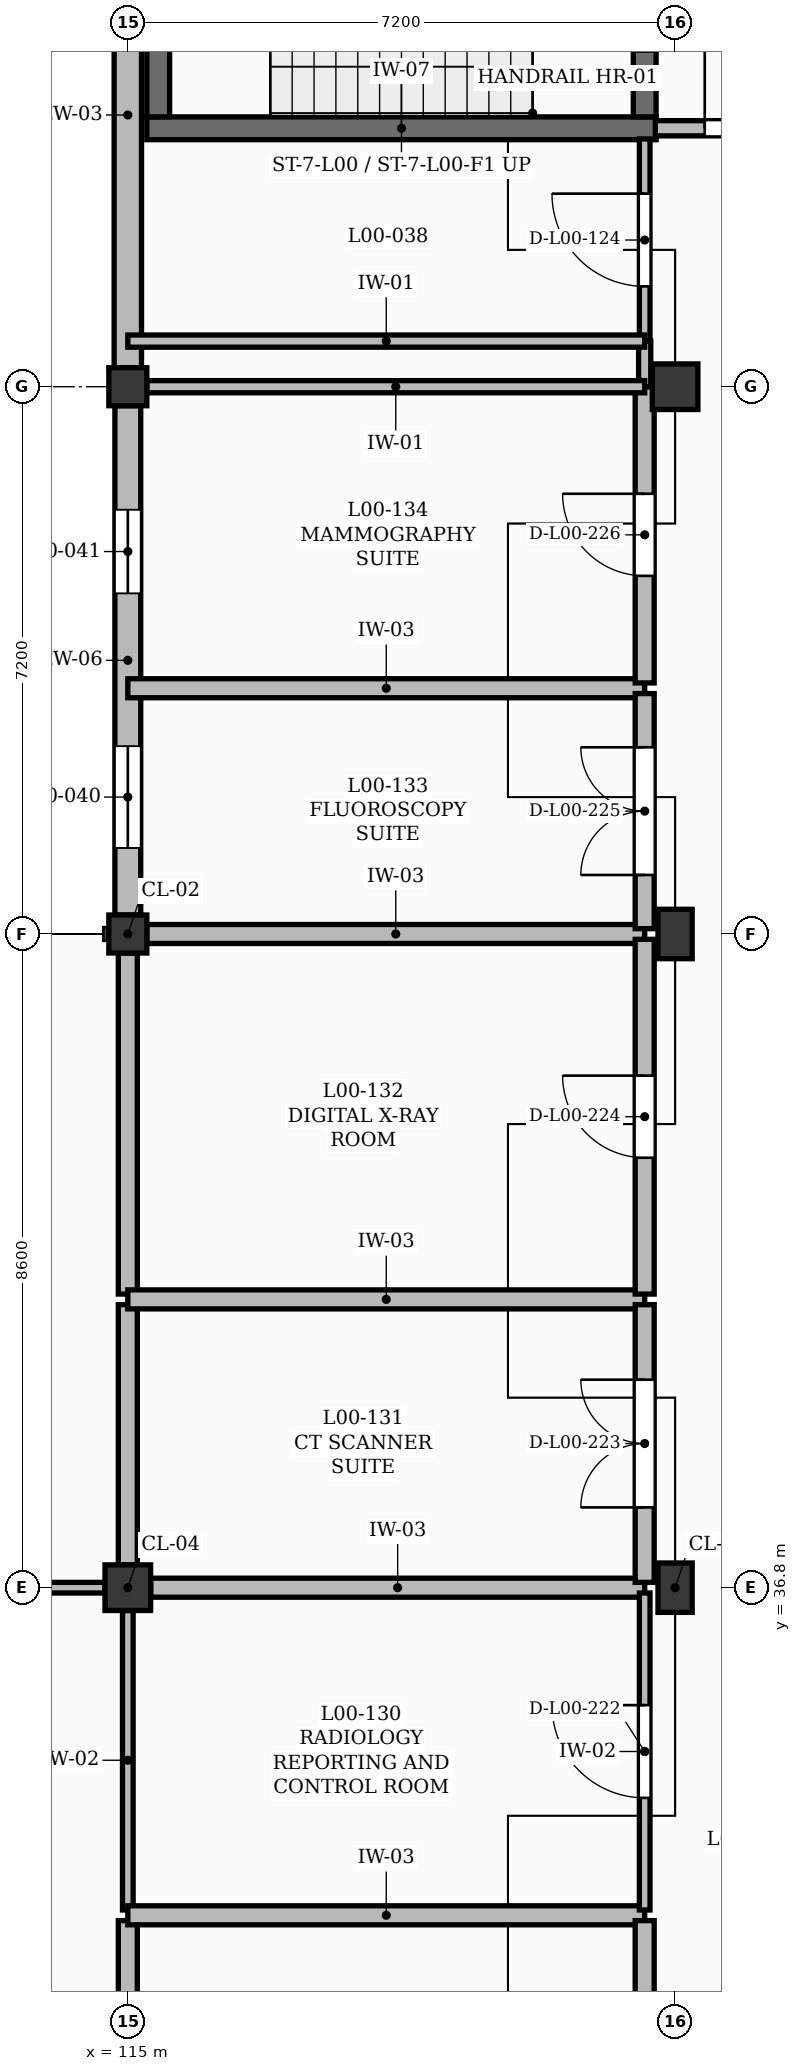
"""IFC4 building model, lengths in metres.
Left out: names, types, materials, properties, quantities, classifications, styles, units other than length and angle.
Written with IfcOpenShell. Run it as: python <this file> out.ifc"""

import sys

from ifc_helpers import new_model, si_unit, direction, frame, frame_2d, origin, origin_2d, place, context, subcontext, project, spatial, rectangle, extrude, element, fill, save


model = new_model("IFC4")
c1 = context("Model", 3, precision=1e-05, world=origin(), true_north=direction((0.0, 1.0)))
c2 = subcontext(c1, "Body", "Model", "MODEL_VIEW")
j1 = project(units=[si_unit("LENGTHUNIT", "METRE"), si_unit("PLANEANGLEUNIT", "RADIAN")], contexts=[c1])
p1 = place(None, origin())
s1 = spatial("IfcSite", under=j1, at=p1, CompositionType="ELEMENT")
p2 = place(p1, origin())
s2 = spatial("IfcBuilding", under=s1, at=p2, CompositionType="ELEMENT")
p3 = place(p2, origin())
s3 = spatial("IfcBuildingStorey", under=s2, at=p3, CompositionType="ELEMENT", Elevation=0.0)
p4 = place(p3, frame((115.0, 36.8, 0.0), z_axis=(0.0, 0.0, 1.0), x_axis=(1.0, 0.0, 0.0)))
e1 = element("IfcColumn", 1, at=p4, inside=s3, PredefinedType="COLUMN", context=c2, shape_type="SweptSolid", body=[
    extrude(rectangle(XDim=0.6, YDim=0.6, at=origin_2d()), origin(), (0.0, 0.0, 1.0), 4.2),
])
for number, where, z_axis, x_axis in (
    (2, (115.0, 45.4, 0.0), (0.0, 0.0, 1.0), (1.0, 0.0, 0.0)),
    (3, (115.0, 52.6, 0.0), (0.0, 0.0, 1.0), (1.0, 0.0, 0.0)),
):
    element("IfcColumn", number, at=place(p3, frame(where, z_axis=z_axis, x_axis=x_axis)), inside=s3, PredefinedType="COLUMN", context=c2, shape_type="SweptSolid", body=[
        extrude(rectangle(XDim=0.5, YDim=0.5, at=origin_2d()), origin(), (0.0, 0.0, 1.0), 4.2),
    ])
for number, where, z_axis, x_axis in (
    (4, (122.2, 36.8, 0.0), (0.0, 0.0, 1.0), (1.0, 0.0, 0.0)),
    (5, (122.2, 45.4, 0.0), (0.0, 0.0, 1.0), (1.0, 0.0, 0.0)),
):
    element("IfcColumn", number, at=place(p3, frame(where, z_axis=z_axis, x_axis=x_axis)), inside=s3, PredefinedType="COLUMN", context=c2, shape_type="SweptSolid", body=[
        extrude(rectangle(XDim=0.45, YDim=0.65, at=origin_2d()), origin(), (0.0, 0.0, 1.0), 4.2),
    ])
p5 = place(p3, frame((122.2, 52.6, 0.0), z_axis=(0.0, 0.0, 1.0), x_axis=(1.0, 0.0, 0.0)))
e6 = element("IfcColumn", 6, at=p5, inside=s3, PredefinedType="COLUMN", context=c2, shape_type="SweptSolid", body=[
    extrude(rectangle(XDim=0.6, YDim=0.6, at=origin_2d()), origin(), (0.0, 0.0, 1.0), 4.2),
])
p6 = place(p3, frame((115.0, 45.65, 0.0), z_axis=(0.0, 0.0, 1.0), x_axis=(0.0, 1.0, 0.0)))
e7 = element("IfcWall", 7, at=p6, inside=s3, PredefinedType="SOLIDWALL", context=c2, shape_type="SweptSolid", body=[
    extrude(rectangle(XDim=6.7, YDim=0.34, at=frame_2d((3.35, 0.0))), origin(), (0.0, 0.0, 1.0), 3.68),
])
p7 = place(p6, frame((0.881, 0.0, 1.0)))
e8 = element("IfcOpeningElement", 8, at=p7, cuts=e7, PredefinedType="OPENING", context=c2, shape_type="SweptSolid", body=[
    extrude(rectangle(XDim=1.34, YDim=1.95, at=frame_2d((0.67, 0.975))), frame((0.0, 0.18, 0.0), z_axis=(0.0, -1.0, 0.0), x_axis=(1.0, 0.0, 0.0)), (0.0, 0.0, 1.0), 0.36),
])
p8 = place(p6, frame((4.231, 0.0, 1.0)))
e9 = element("IfcOpeningElement", 9, at=p8, cuts=e7, PredefinedType="OPENING", context=c2, shape_type="SweptSolid", body=[
    extrude(rectangle(XDim=1.1, YDim=2.2, at=frame_2d((0.55, 1.1))), frame((0.0, 0.18, 0.0), z_axis=(0.0, -1.0, 0.0), x_axis=(1.0, 0.0, 0.0)), (0.0, 0.0, 1.0), 0.36),
])
p9 = place(p3, frame((115.0, 52.85, 0.0), z_axis=(0.0, 0.0, 1.0), x_axis=(0.0, 1.0, 0.0)))
e10 = element("IfcWall", 10, at=p9, inside=s3, PredefinedType="SOLIDWALL", context=c2, shape_type="SweptSolid", body=[
    extrude(rectangle(XDim=6.65, YDim=0.36, at=frame_2d((3.325, 0.0))), origin(), (0.0, 0.0, 1.0), 3.68),
])
p10 = place(p3, frame((115.25, 56.0, 0.0), z_axis=(0.0, 0.0, 1.0), x_axis=(1.0, 0.0, 0.0)))
e11 = element("IfcWall", 11, at=p10, inside=s3, PredefinedType="SHEAR", context=c2, shape_type="SweptSolid", body=[
    extrude(rectangle(XDim=6.7, YDim=0.3, at=frame_2d((3.35, 0.0))), origin(), (0.0, 0.0, 1.0), 4.25),
])
p11 = place(p3, frame((115.4, 56.15, 0.0), z_axis=(0.0, 0.0, 1.0), x_axis=(0.0, 1.0, 0.0)))
e12 = element("IfcWall", 12, at=p11, inside=s3, PredefinedType="SHEAR", context=c2, shape_type="SweptSolid", body=[
    extrude(rectangle(XDim=2.9, YDim=0.3, at=frame_2d((1.45, 0.0))), origin(), (0.0, 0.0, 1.0), 4.25),
])
p12 = place(p3, frame((121.8, 56.15, 0.0), z_axis=(0.0, 0.0, 1.0), x_axis=(0.0, 1.0, 0.0)))
e13 = element("IfcWall", 13, at=p12, inside=s3, PredefinedType="SHEAR", context=c2, shape_type="SweptSolid", body=[
    extrude(rectangle(XDim=2.9, YDim=0.3, at=frame_2d((1.45, 0.0))), origin(), (0.0, 0.0, 1.0), 4.25),
])
p13 = place(p12, frame((0.86, 0.0, 0.0)))
e14 = element("IfcOpeningElement", 14, at=p13, cuts=e13, PredefinedType="OPENING", context=c2, shape_type="SweptSolid", body=[
    extrude(rectangle(XDim=1.18, YDim=2.15, at=frame_2d((0.59, 1.075))), frame((0.0, 0.16, 0.0), z_axis=(0.0, -1.0, 0.0), x_axis=(1.0, 0.0, 0.0)), (0.0, 0.0, 1.0), 0.32),
])
p14 = place(p3, frame((110.6, 36.8, 0.0), z_axis=(0.0, 0.0, 1.0), x_axis=(1.0, 0.0, 0.0)))
e15 = element("IfcWall", 15, at=p14, inside=s3, PredefinedType="PARTITIONING", context=c2, shape_type="SweptSolid", body=[
    extrude(rectangle(XDim=4.1, YDim=0.14, at=frame_2d((2.05, 0.0))), origin(), (0.0, 0.0, 1.0), 3.5),
])
p15 = place(p3, frame((115.0, 27.45, 0.0), z_axis=(0.0, 0.0, 1.0), x_axis=(0.0, 1.0, 0.0)))
e16 = element("IfcWall", 16, at=p15, inside=s3, PredefinedType="SOLIDWALL", context=c2, shape_type="SweptSolid", body=[
    extrude(rectangle(XDim=4.97, YDim=0.25, at=frame_2d((2.485, 0.0))), origin(), (0.0, 0.0, 1.0), 3.4),
])
p16 = place(p3, frame((115.0, 32.56, 0.0), z_axis=(0.0, 0.0, 1.0), x_axis=(0.0, 1.0, 0.0)))
e17 = element("IfcWall", 17, at=p16, inside=s3, PredefinedType="PARTITIONING", context=c2, shape_type="SweptSolid", body=[
    extrude(rectangle(XDim=3.94, YDim=0.14, at=frame_2d((1.97, 0.0))), origin(), (0.0, 0.0, 1.0), 3.4),
])
p17 = place(p3, frame((115.0, 32.49, 0.0), z_axis=(0.0, 0.0, 1.0), x_axis=(1.0, 0.0, 0.0)))
e18 = element("IfcWall", 18, at=p17, inside=s3, PredefinedType="SOLIDWALL", context=c2, shape_type="SweptSolid", body=[
    extrude(rectangle(XDim=6.8, YDim=0.25, at=frame_2d((3.4, 0.0))), origin(), (0.0, 0.0, 1.0), 4.18),
])
p18 = place(p3, frame((115.0, 37.1, 0.0), z_axis=(0.0, 0.0, 1.0), x_axis=(0.0, 1.0, 0.0)))
e19 = element("IfcWall", 19, at=p18, inside=s3, PredefinedType="SOLIDWALL", context=c2, shape_type="SweptSolid", body=[
    extrude(rectangle(XDim=3.423, YDim=0.25, at=frame_2d((1.711, 0.0))), origin(), (0.0, 0.0, 1.0), 3.4),
])
p19 = place(p3, frame((115.3, 36.8, 0.0), z_axis=(0.0, 0.0, 1.0), x_axis=(1.0, 0.0, 0.0)))
e20 = element("IfcWall", 20, at=p19, inside=s3, PredefinedType="SOLIDWALL", context=c2, shape_type="SweptSolid", body=[
    extrude(rectangle(XDim=6.5, YDim=0.25, at=frame_2d((3.25, 0.0))), origin(), (0.0, 0.0, 1.0), 3.5),
])
p20 = place(p3, frame((115.0, 40.663, 0.0), z_axis=(0.0, 0.0, 1.0), x_axis=(0.0, 1.0, 0.0)))
e21 = element("IfcWall", 21, at=p20, inside=s3, PredefinedType="SOLIDWALL", context=c2, shape_type="SweptSolid", body=[
    extrude(rectangle(XDim=4.487, YDim=0.25, at=frame_2d((2.243, 0.0))), origin(), (0.0, 0.0, 1.0), 3.4),
])
p21 = place(p3, frame((115.0, 40.593, 0.0), z_axis=(0.0, 0.0, 1.0), x_axis=(1.0, 0.0, 0.0)))
e22 = element("IfcWall", 22, at=p21, inside=s3, PredefinedType="SOLIDWALL", context=c2, shape_type="SweptSolid", body=[
    extrude(rectangle(XDim=6.8, YDim=0.25, at=frame_2d((3.4, 0.0))), origin(), (0.0, 0.0, 1.0), 4.18),
])
p22 = place(p3, frame((115.25, 45.4, 0.0), z_axis=(0.0, 0.0, 1.0), x_axis=(1.0, 0.0, 0.0)))
e23 = element("IfcWall", 23, at=p22, inside=s3, PredefinedType="SOLIDWALL", context=c2, shape_type="SweptSolid", body=[
    extrude(rectangle(XDim=6.55, YDim=0.25, at=frame_2d((3.275, 0.0))), origin(), (0.0, 0.0, 1.0), 3.25),
])
p23 = place(p3, frame((115.0, 48.633, 0.0), z_axis=(0.0, 0.0, 1.0), x_axis=(1.0, 0.0, 0.0)))
e24 = element("IfcWall", 24, at=p23, inside=s3, PredefinedType="SOLIDWALL", context=c2, shape_type="SweptSolid", body=[
    extrude(rectangle(XDim=6.8, YDim=0.25, at=frame_2d((3.4, 0.0))), origin(), (0.0, 0.0, 1.0), 4.18),
])
p24 = place(p3, frame((121.8, 27.27, 0.0), z_axis=(0.0, 0.0, 1.0), x_axis=(0.0, 1.0, 0.0)))
e25 = element("IfcWall", 25, at=p24, inside=s3, PredefinedType="SOLIDWALL", context=c2, shape_type="SweptSolid", body=[
    extrude(rectangle(XDim=5.15, YDim=0.25, at=frame_2d((2.575, 0.0))), origin(), (0.0, 0.0, 1.0), 4.18),
])
p25 = place(p24, frame((1.735, 0.0, 0.0)))
e26 = element("IfcOpeningElement", 26, at=p25, cuts=e25, PredefinedType="OPENING", context=c2, shape_type="SweptSolid", body=[
    extrude(rectangle(XDim=1.68, YDim=2.3, at=frame_2d((0.84, 1.15))), frame((0.0, 0.135, 0.0), z_axis=(0.0, -1.0, 0.0), x_axis=(1.0, 0.0, 0.0)), (0.0, 0.0, 1.0), 0.27),
])
p26 = place(p3, frame((121.8, 32.56, 0.0), z_axis=(0.0, 0.0, 1.0), x_axis=(0.0, 1.0, 0.0)))
e27 = element("IfcWall", 27, at=p26, inside=s3, PredefinedType="PARTITIONING", context=c2, shape_type="SweptSolid", body=[
    extrude(rectangle(XDim=4.17, YDim=0.14, at=frame_2d((2.085, 0.0))), origin(), (0.0, 0.0, 1.0), 4.18),
])
p27 = place(p26, frame((1.475, 0.0, 0.0)))
e28 = element("IfcOpeningElement", 28, at=p27, cuts=e27, PredefinedType="OPENING", context=c2, shape_type="SweptSolid", body=[
    extrude(rectangle(XDim=1.22, YDim=2.1, at=frame_2d((0.61, 1.05))), frame((0.0, 0.08, 0.0), z_axis=(0.0, -1.0, 0.0), x_axis=(1.0, 0.0, 0.0)), (0.0, 0.0, 1.0), 0.16),
])
p28 = place(p3, frame((121.8, 36.87, 0.0), z_axis=(0.0, 0.0, 1.0), x_axis=(0.0, 1.0, 0.0)))
e29 = element("IfcWall", 29, at=p28, inside=s3, PredefinedType="SOLIDWALL", context=c2, shape_type="SweptSolid", body=[
    extrude(rectangle(XDim=3.653, YDim=0.25, at=frame_2d((1.826, 0.0))), origin(), (0.0, 0.0, 1.0), 4.18),
])
p29 = place(p28, frame((0.987, 0.0, 0.0)))
e30 = element("IfcOpeningElement", 30, at=p29, cuts=e29, PredefinedType="OPENING", context=c2, shape_type="SweptSolid", body=[
    extrude(rectangle(XDim=1.68, YDim=2.3, at=frame_2d((0.84, 1.15))), frame((0.0, 0.135, 0.0), z_axis=(0.0, -1.0, 0.0), x_axis=(1.0, 0.0, 0.0)), (0.0, 0.0, 1.0), 0.27),
])
p30 = place(p3, frame((121.8, 40.663, 0.0), z_axis=(0.0, 0.0, 1.0), x_axis=(0.0, 1.0, 0.0)))
e31 = element("IfcWall", 31, at=p30, inside=s3, PredefinedType="SOLIDWALL", context=c2, shape_type="SweptSolid", body=[
    extrude(rectangle(XDim=4.667, YDim=0.25, at=frame_2d((2.333, 0.0))), origin(), (0.0, 0.0, 1.0), 4.18),
])
p31 = place(p30, frame((1.793, 0.0, 0.0)))
e32 = element("IfcOpeningElement", 32, at=p31, cuts=e31, PredefinedType="OPENING", context=c2, shape_type="SweptSolid", body=[
    extrude(rectangle(XDim=1.08, YDim=2.15, at=frame_2d((0.54, 1.075))), frame((0.0, 0.135, 0.0), z_axis=(0.0, -1.0, 0.0), x_axis=(1.0, 0.0, 0.0)), (0.0, 0.0, 1.0), 0.27),
])
p32 = place(p3, frame((121.8, 45.47, 0.0), z_axis=(0.0, 0.0, 1.0), x_axis=(0.0, 1.0, 0.0)))
e33 = element("IfcWall", 33, at=p32, inside=s3, PredefinedType="SOLIDWALL", context=c2, shape_type="SweptSolid", body=[
    extrude(rectangle(XDim=3.093, YDim=0.25, at=frame_2d((1.546, 0.0))), origin(), (0.0, 0.0, 1.0), 4.18),
])
p33 = place(p32, frame((0.707, 0.0, 0.0)))
e34 = element("IfcOpeningElement", 34, at=p33, cuts=e33, PredefinedType="OPENING", context=c2, shape_type="SweptSolid", body=[
    extrude(rectangle(XDim=1.68, YDim=2.3, at=frame_2d((0.84, 1.15))), frame((0.0, 0.135, 0.0), z_axis=(0.0, -1.0, 0.0), x_axis=(1.0, 0.0, 0.0)), (0.0, 0.0, 1.0), 0.27),
])
p34 = place(p3, frame((121.8, 48.703, 0.0), z_axis=(0.0, 0.0, 1.0), x_axis=(0.0, 1.0, 0.0)))
e35 = element("IfcWall", 35, at=p34, inside=s3, PredefinedType="SOLIDWALL", context=c2, shape_type="SweptSolid", body=[
    extrude(rectangle(XDim=3.897, YDim=0.25, at=frame_2d((1.949, 0.0))), origin(), (0.0, 0.0, 1.0), 4.18),
])
p35 = place(p34, frame((1.408, 0.0, 0.0)))
e36 = element("IfcOpeningElement", 36, at=p35, cuts=e35, PredefinedType="OPENING", context=c2, shape_type="SweptSolid", body=[
    extrude(rectangle(XDim=1.08, YDim=2.15, at=frame_2d((0.54, 1.075))), frame((0.0, 0.135, 0.0), z_axis=(0.0, -1.0, 0.0), x_axis=(1.0, 0.0, 0.0)), (0.0, 0.0, 1.0), 0.27),
])
p36 = place(p3, frame((121.8, 53.2, 0.0), z_axis=(0.0, 0.0, 1.0), x_axis=(0.0, 1.0, 0.0)))
e37 = element("IfcWall", 37, at=p36, inside=s3, PredefinedType="PARTITIONING", context=c2, shape_type="SweptSolid", body=[
    extrude(rectangle(XDim=2.66, YDim=0.14, at=frame_2d((1.33, 0.0))), origin(), (0.0, 0.0, 1.0), 4.18),
])
p37 = place(p36, frame((0.72, 0.0, 0.0)))
e38 = element("IfcOpeningElement", 38, at=p37, cuts=e37, PredefinedType="OPENING", context=c2, shape_type="SweptSolid", body=[
    extrude(rectangle(XDim=1.22, YDim=2.1, at=frame_2d((0.61, 1.05))), frame((0.0, 0.08, 0.0), z_axis=(0.0, -1.0, 0.0), x_axis=(1.0, 0.0, 0.0)), (0.0, 0.0, 1.0), 0.16),
])
p38 = place(p3, frame((121.94, 56.0, 0.0), z_axis=(0.0, 0.0, 1.0), x_axis=(1.0, 0.0, 0.0)))
e39 = element("IfcWall", 39, at=p38, inside=s3, PredefinedType="PARTITIONING", context=c2, shape_type="SweptSolid", body=[
    extrude(rectangle(XDim=2.66, YDim=0.2, at=frame_2d((1.33, 0.0))), origin(), (0.0, 0.0, 1.0), 4.18),
])
p39 = place(p38, frame((0.65, 0.0, 0.0)))
e40 = element("IfcOpeningElement", 40, at=p39, cuts=e39, PredefinedType="OPENING", context=c2, shape_type="SweptSolid", body=[
    extrude(rectangle(XDim=1.36, YDim=2.2, at=frame_2d((0.68, 1.1))), frame((0.0, 0.11, 0.0), z_axis=(0.0, -1.0, 0.0), x_axis=(1.0, 0.0, 0.0)), (0.0, 0.0, 1.0), 0.22),
])
p40 = place(p3, frame((121.8, 52.6, 0.0), z_axis=(0.0, 0.0, 1.0), x_axis=(0.0, 1.0, 0.0)))
e41 = element("IfcWall", 41, at=p40, inside=s3, PredefinedType="PARTITIONING", context=c2, shape_type="SweptSolid", body=[
    extrude(rectangle(XDim=0.6, YDim=0.16, at=frame_2d((0.3, 0.0))), origin(), (0.0, 0.0, 1.0), 4.18),
])
p41 = place(p3, frame((115.0, 53.2, 0.0), z_axis=(0.0, 0.0, 1.0), x_axis=(1.0, 0.0, 0.0)))
e42 = element("IfcWall", 42, at=p41, inside=s3, PredefinedType="PARTITIONING", context=c2, shape_type="SweptSolid", body=[
    extrude(rectangle(XDim=6.8, YDim=0.16, at=frame_2d((3.4, 0.0))), origin(), (0.0, 0.0, 1.0), 4.18),
])
p42 = place(p3, frame((121.8, 52.6, 0.0), z_axis=(0.0, 0.0, 1.0), x_axis=(-1.0, 0.0, 0.0)))
e43 = element("IfcWall", 43, at=p42, inside=s3, PredefinedType="PARTITIONING", context=c2, shape_type="SweptSolid", body=[
    extrude(rectangle(XDim=6.55, YDim=0.16, at=frame_2d((3.275, 0.0))), origin(), (0.0, 0.0, 1.0), 3.5),
])
p43 = place(p7, origin())
e44 = element("IfcWindow", 44, at=p43, inside=s3, PartitioningType="SINGLE_PANEL", PredefinedType="WINDOW", context=c2, shape_type="SweptSolid", body=[
    extrude(rectangle(XDim=1.34, YDim=1.95, at=frame_2d((0.67, 0.975))), frame((0.0, 0.03, 0.0), z_axis=(0.0, -1.0, 0.0), x_axis=(1.0, 0.0, 0.0)), (0.0, 0.0, 1.0), 0.06),
])
fill(e8, e44)
p44 = place(p8, origin())
e45 = element("IfcWindow", 45, at=p44, inside=s3, PartitioningType="SINGLE_PANEL", PredefinedType="WINDOW", context=c2, shape_type="SweptSolid", body=[
    extrude(rectangle(XDim=1.1, YDim=2.2, at=frame_2d((0.55, 1.1))), frame((0.0, 0.03, 0.0), z_axis=(0.0, -1.0, 0.0), x_axis=(1.0, 0.0, 0.0)), (0.0, 0.0, 1.0), 0.06),
])
fill(e9, e45)
p45 = place(p37, origin())
e46 = element("IfcDoor", 46, at=p45, inside=s3, OperationType="SINGLE_SWING_RIGHT", PredefinedType="DOOR", context=c2, shape_type="SweptSolid", body=[
    extrude(rectangle(XDim=1.22, YDim=2.1, at=frame_2d((0.61, 1.05))), frame((0.0, 0.025, 0.0), z_axis=(0.0, -1.0, 0.0), x_axis=(1.0, 0.0, 0.0)), (0.0, 0.0, 1.0), 0.05),
])
fill(e38, e46)
p46 = place(p39, origin())
e47 = element("IfcDoor", 47, at=p46, inside=s3, OperationType="SINGLE_SWING_LEFT", PredefinedType="DOOR", context=c2, shape_type="SweptSolid", body=[
    extrude(rectangle(XDim=1.36, YDim=2.2, at=frame_2d((0.68, 1.1))), frame((0.0, 0.025, 0.0), z_axis=(0.0, -1.0, 0.0), x_axis=(1.0, 0.0, 0.0)), (0.0, 0.0, 1.0), 0.05),
])
fill(e40, e47)
p47 = place(p27, origin())
e48 = element("IfcDoor", 48, at=p47, inside=s3, OperationType="SINGLE_SWING_RIGHT", PredefinedType="DOOR", context=c2, shape_type="SweptSolid", body=[
    extrude(rectangle(XDim=1.22, YDim=2.1, at=frame_2d((0.61, 1.05))), frame((0.0, 0.025, 0.0), z_axis=(0.0, -1.0, 0.0), x_axis=(1.0, 0.0, 0.0)), (0.0, 0.0, 1.0), 0.05),
])
fill(e28, e48)
p48 = place(p29, origin())
e49 = element("IfcDoor", 49, at=p48, inside=s3, OperationType="DOUBLE_DOOR_SINGLE_SWING", PredefinedType="DOOR", context=c2, shape_type="SweptSolid", body=[
    extrude(rectangle(XDim=1.68, YDim=2.3, at=frame_2d((0.84, 1.15))), frame((0.0, 0.025, 0.0), z_axis=(0.0, -1.0, 0.0), x_axis=(1.0, 0.0, 0.0)), (0.0, 0.0, 1.0), 0.05),
])
fill(e30, e49)
p49 = place(p31, origin())
e50 = element("IfcDoor", 50, at=p49, inside=s3, OperationType="SINGLE_SWING_RIGHT", PredefinedType="DOOR", context=c2, shape_type="SweptSolid", body=[
    extrude(rectangle(XDim=1.08, YDim=2.15, at=frame_2d((0.54, 1.075))), frame((0.0, 0.025, 0.0), z_axis=(0.0, -1.0, 0.0), x_axis=(1.0, 0.0, 0.0)), (0.0, 0.0, 1.0), 0.05),
])
fill(e32, e50)
p50 = place(p33, origin())
e51 = element("IfcDoor", 51, at=p50, inside=s3, OperationType="DOUBLE_DOOR_SINGLE_SWING", PredefinedType="DOOR", context=c2, shape_type="SweptSolid", body=[
    extrude(rectangle(XDim=1.68, YDim=2.3, at=frame_2d((0.84, 1.15))), frame((0.0, 0.025, 0.0), z_axis=(0.0, -1.0, 0.0), x_axis=(1.0, 0.0, 0.0)), (0.0, 0.0, 1.0), 0.05),
])
fill(e34, e51)
p51 = place(p35, origin())
e52 = element("IfcDoor", 52, at=p51, inside=s3, OperationType="SINGLE_SWING_RIGHT", PredefinedType="DOOR", context=c2, shape_type="SweptSolid", body=[
    extrude(rectangle(XDim=1.08, YDim=2.15, at=frame_2d((0.54, 1.075))), frame((0.0, 0.025, 0.0), z_axis=(0.0, -1.0, 0.0), x_axis=(1.0, 0.0, 0.0)), (0.0, 0.0, 1.0), 0.05),
])
fill(e36, e52)
save(model, sys.argv[1])
